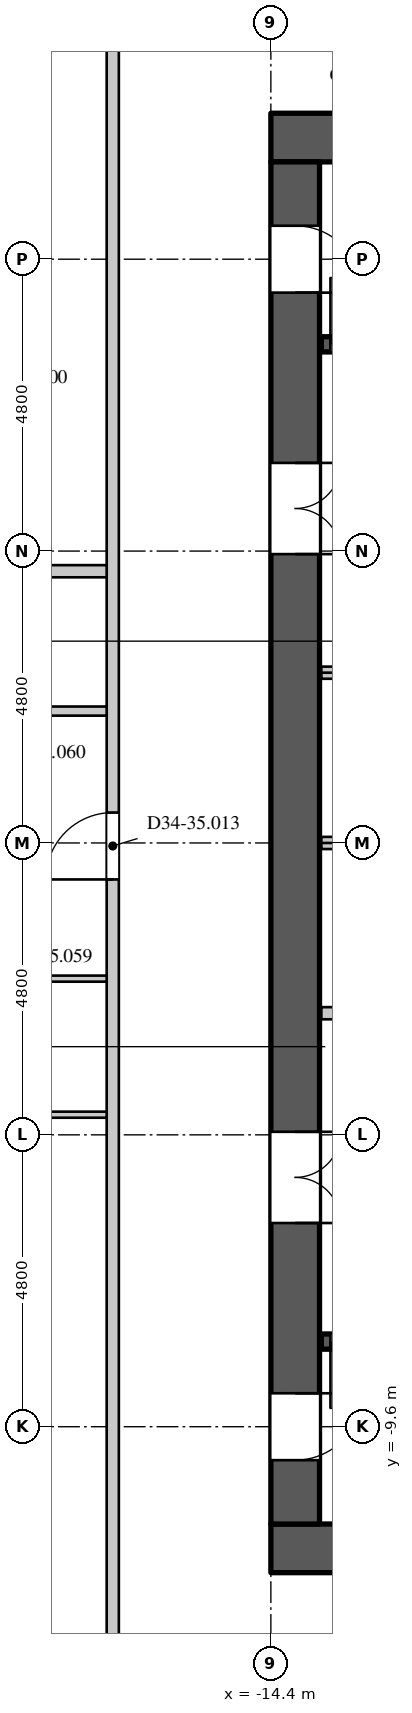
"""IFC4 building model, lengths in metres.
Left out: names, types, materials, properties, quantities, classifications, styles, units other than length and angle.
Written with IfcOpenShell. Run it as: python <this file> out.ifc"""

import sys

from ifc_helpers import new_model, si_unit, direction, frame, frame_2d, origin, place, context, subcontext, project, spatial, rectangle, extrude, element, fill, save


model = new_model("IFC4")
c1 = context("Model", 3, precision=1e-05, world=origin(), true_north=direction((0.0, 1.0)))
c2 = subcontext(c1, "Body", "Model", "MODEL_VIEW")
j1 = project(units=[si_unit("LENGTHUNIT", "METRE"), si_unit("PLANEANGLEUNIT", "RADIAN")], contexts=[c1])
p1 = place(None, origin())
s1 = spatial("IfcSite", under=j1, at=p1, CompositionType="ELEMENT")
p2 = place(p1, origin())
s2 = spatial("IfcBuilding", under=s1, at=p2, CompositionType="ELEMENT")
p3 = place(p2, frame((0.0, 0.0, 148.5)))
s3 = spatial("IfcBuildingStorey", under=s2, at=p3, CompositionType="ELEMENT", Elevation=148.5)
for number, where, z_axis, x_axis in (
    (1, (-14.4, 11.6, 0.0), (0.0, 0.0, 1.0), (1.0, 0.0, 0.0)),
    (2, (-14.4, -11.6, 0.0), (0.0, 0.0, 1.0), (1.0, 0.0, 0.0)),
):
    element("IfcWall", number, at=place(p3, frame(where, z_axis=z_axis, x_axis=x_axis)), inside=s3, PredefinedType="SHEAR", context=c2, shape_type="SweptSolid", body=[
        extrude(rectangle(XDim=28.8, YDim=0.8, at=frame_2d((14.4, 0.0))), origin(), (0.0, 0.0, 1.0), 4.2),
    ])
p4 = place(p3, frame((-14.0, -11.2, 0.0), z_axis=(0.0, 0.0, 1.0), x_axis=(0.0, 1.0, 0.0)))
e3 = element("IfcWall", 3, at=p4, inside=s3, PredefinedType="SHEAR", context=c2, shape_type="SweptSolid", body=[
    extrude(rectangle(XDim=22.4, YDim=0.8, at=frame_2d((11.2, 0.0))), origin(), (0.0, 0.0, 1.0), 4.2),
])
p5 = place(p4, frame((20.25, 0.0, 0.0)))
e4 = element("IfcOpeningElement", 4, at=p5, cuts=e3, PredefinedType="OPENING", context=c2, shape_type="SweptSolid", body=[
    extrude(rectangle(XDim=1.1, YDim=2.2, at=frame_2d((0.55, 1.1))), frame((0.0, 0.41, 0.0), z_axis=(0.0, -1.0, 0.0), x_axis=(1.0, 0.0, 0.0)), (0.0, 0.0, 1.0), 0.82),
])
p6 = place(p4, frame((1.05, 0.0, 0.0)))
e5 = element("IfcOpeningElement", 5, at=p6, cuts=e3, PredefinedType="OPENING", context=c2, shape_type="SweptSolid", body=[
    extrude(rectangle(XDim=1.1, YDim=2.2, at=frame_2d((0.55, 1.1))), frame((0.0, 0.41, 0.0), z_axis=(0.0, -1.0, 0.0), x_axis=(1.0, 0.0, 0.0)), (0.0, 0.0, 1.0), 0.82),
])
p7 = place(p4, frame((15.95, 0.0, 0.0)))
e6 = element("IfcOpeningElement", 6, at=p7, cuts=e3, PredefinedType="OPENING", context=c2, shape_type="SweptSolid", body=[
    extrude(rectangle(XDim=1.5, YDim=2.4, at=frame_2d((0.75, 1.2))), frame((0.0, 0.41, 0.0), z_axis=(0.0, -1.0, 0.0), x_axis=(1.0, 0.0, 0.0)), (0.0, 0.0, 1.0), 0.82),
])
p8 = place(p4, frame((4.95, 0.0, 0.0)))
e7 = element("IfcOpeningElement", 7, at=p8, cuts=e3, PredefinedType="OPENING", context=c2, shape_type="SweptSolid", body=[
    extrude(rectangle(XDim=1.5, YDim=2.4, at=frame_2d((0.75, 1.2))), frame((0.0, 0.41, 0.0), z_axis=(0.0, -1.0, 0.0), x_axis=(1.0, 0.0, 0.0)), (0.0, 0.0, 1.0), 0.82),
])
p9 = place(p3, frame((-17.0, -14.5, 0.0), z_axis=(0.0, 0.0, 1.0), x_axis=(0.0, 1.0, 0.0)))
e8 = element("IfcWall", 8, at=p9, inside=s3, PredefinedType="PARTITIONING", context=c2, shape_type="SweptSolid", body=[
    extrude(rectangle(XDim=29.0, YDim=0.2, at=frame_2d((14.5, 0.0))), origin(), (0.0, 0.0, 1.0), 3.798),
])
p10 = place(p9, frame((13.9, 0.0, 0.0)))
e9 = element("IfcOpeningElement", 9, at=p10, cuts=e8, PredefinedType="OPENING", context=c2, shape_type="SweptSolid", body=[
    extrude(rectangle(XDim=1.1, YDim=2.4, at=frame_2d((0.55, 1.2))), frame((0.0, 0.11, 0.0), z_axis=(0.0, -1.0, 0.0), x_axis=(1.0, 0.0, 0.0)), (0.0, 0.0, 1.0), 0.22),
])
p11 = place(p3, frame((-21.347, -11.388, 0.0), z_axis=(0.0, 0.0, 1.0), x_axis=(0.707106781187, -0.707106781187, 0.0)))
e10 = element("IfcWall", 10, at=p11, inside=s3, PredefinedType="PARTITIONING", context=c2, shape_type="SweptSolid", body=[
    extrude(rectangle(XDim=6.967, YDim=0.15, at=frame_2d((3.483, 0.0))), origin(), (0.0, 0.0, 1.0), 3.798),
])
p12 = place(p11, frame((2.75, 0.0, 0.0)))
e11 = element("IfcOpeningElement", 11, at=p12, cuts=e10, PredefinedType="OPENING", context=c2, shape_type="SweptSolid", body=[
    extrude(rectangle(XDim=0.95, YDim=2.2, at=frame_2d((0.475, 1.1))), frame((0.0, 0.085, 0.0), z_axis=(0.0, -1.0, 0.0), x_axis=(1.0, 0.0, 0.0)), (0.0, 0.0, 1.0), 0.17),
])
p13 = place(p3, frame((-21.347, 11.388, 0.0), z_axis=(0.0, 0.0, 1.0), x_axis=(0.707106781187, 0.707106781187, 0.0)))
e12 = element("IfcWall", 12, at=p13, inside=s3, PredefinedType="PARTITIONING", context=c2, shape_type="SweptSolid", body=[
    extrude(rectangle(XDim=8.836, YDim=0.15, at=frame_2d((4.418, 0.0))), origin(), (0.0, 0.0, 1.0), 3.798),
])
p14 = place(p13, frame((2.75, 0.0, 0.0)))
e13 = element("IfcOpeningElement", 13, at=p14, cuts=e12, PredefinedType="OPENING", context=c2, shape_type="SweptSolid", body=[
    extrude(rectangle(XDim=0.95, YDim=2.2, at=frame_2d((0.475, 1.1))), frame((0.0, 0.085, 0.0), z_axis=(0.0, -1.0, 0.0), x_axis=(1.0, 0.0, 0.0)), (0.0, 0.0, 1.0), 0.17),
])
p15 = place(p13, frame((7.45, 0.0, 0.0)))
e14 = element("IfcOpeningElement", 14, at=p15, cuts=e12, PredefinedType="OPENING", context=c2, shape_type="SweptSolid", body=[
    extrude(rectangle(XDim=0.95, YDim=2.2, at=frame_2d((0.475, 1.1))), frame((0.0, 0.085, 0.0), z_axis=(0.0, -1.0, 0.0), x_axis=(1.0, 0.0, 0.0)), (0.0, 0.0, 1.0), 0.17),
])
p16 = place(p3, frame((-20.725, 2.169, 0.0), z_axis=(0.0, 0.0, 1.0), x_axis=(1.0, 0.0, 0.0)))
e15 = element("IfcWall", 15, at=p16, inside=s3, PredefinedType="PARTITIONING", context=c2, shape_type="SweptSolid", body=[
    extrude(rectangle(XDim=3.625, YDim=0.15, at=frame_2d((1.812, 0.0))), origin(), (0.0, 0.0, 1.0), 3.798),
])
p17 = place(p16, frame((0.85, 0.0, 0.0)))
e16 = element("IfcOpeningElement", 16, at=p17, cuts=e15, PredefinedType="OPENING", context=c2, shape_type="SweptSolid", body=[
    extrude(rectangle(XDim=0.95, YDim=2.2, at=frame_2d((0.475, 1.1))), frame((0.0, 0.085, 0.0), z_axis=(0.0, -1.0, 0.0), x_axis=(1.0, 0.0, 0.0)), (0.0, 0.0, 1.0), 0.17),
])
p18 = place(p3, frame((-25.65, 4.469, 0.0), z_axis=(0.0, 0.0, 1.0), x_axis=(1.0, 0.0, 0.0)))
e17 = element("IfcWall", 17, at=p18, inside=s3, PredefinedType="PARTITIONING", context=c2, shape_type="SweptSolid", body=[
    extrude(rectangle(XDim=8.55, YDim=0.2, at=frame_2d((4.275, 0.0))), origin(), (0.0, 0.0, 1.0), 3.15),
])
p19 = place(p3, frame((-13.57, -2.8, 0.0), z_axis=(0.0, 0.0, 1.0), x_axis=(1.0, 0.0, 0.0)))
e18 = element("IfcWall", 18, at=p19, inside=s3, PredefinedType="PARTITIONING", context=c2, shape_type="SweptSolid", body=[
    extrude(rectangle(XDim=3.19, YDim=0.2, at=frame_2d((1.595, 0.0))), origin(), (0.0, 0.0, 1.0), 3.798),
])
p20 = place(p19, frame((1.25, 0.0, 0.0)))
e19 = element("IfcOpeningElement", 19, at=p20, cuts=e18, PredefinedType="OPENING", context=c2, shape_type="SweptSolid", body=[
    extrude(rectangle(XDim=0.6, YDim=2.0, at=frame_2d((0.3, 1.0))), frame((0.0, 0.11, 0.0), z_axis=(0.0, -1.0, 0.0), x_axis=(1.0, 0.0, 0.0)), (0.0, 0.0, 1.0), 0.22),
])
p21 = place(p3, frame((-13.57, 0.0, 0.0), z_axis=(0.0, 0.0, 1.0), x_axis=(1.0, 0.0, 0.0)))
e20 = element("IfcWall", 20, at=p21, inside=s3, PredefinedType="PARTITIONING", context=c2, shape_type="SweptSolid", body=[
    extrude(rectangle(XDim=23.97, YDim=0.2, at=frame_2d((11.985, 0.0))), origin(), (0.0, 0.0, 1.0), 3.798),
])
p22 = place(p3, frame((-13.57, 2.8, 0.0), z_axis=(0.0, 0.0, 1.0), x_axis=(1.0, 0.0, 0.0)))
e21 = element("IfcWall", 21, at=p22, inside=s3, PredefinedType="PARTITIONING", context=c2, shape_type="SweptSolid", body=[
    extrude(rectangle(XDim=23.97, YDim=0.2, at=frame_2d((11.985, 0.0))), origin(), (0.0, 0.0, 1.0), 3.798),
])
p23 = place(p22, frame((1.0, 0.0, 0.0)))
e22 = element("IfcOpeningElement", 22, at=p23, cuts=e21, PredefinedType="OPENING", context=c2, shape_type="SweptSolid", body=[
    extrude(rectangle(XDim=1.1, YDim=2.2, at=frame_2d((0.55, 1.1))), frame((0.0, 0.11, 0.0), z_axis=(0.0, -1.0, 0.0), x_axis=(1.0, 0.0, 0.0)), (0.0, 0.0, 1.0), 0.22),
])
p24 = place(p22, frame((3.9, 0.0, 0.0)))
e23 = element("IfcOpeningElement", 23, at=p24, cuts=e21, PredefinedType="OPENING", context=c2, shape_type="SweptSolid", body=[
    extrude(rectangle(XDim=1.1, YDim=2.2, at=frame_2d((0.55, 1.1))), frame((0.0, 0.11, 0.0), z_axis=(0.0, -1.0, 0.0), x_axis=(1.0, 0.0, 0.0)), (0.0, 0.0, 1.0), 0.22),
])
p25 = place(p22, frame((6.5, 0.0, 0.0)))
e24 = element("IfcOpeningElement", 24, at=p25, cuts=e21, PredefinedType="OPENING", context=c2, shape_type="SweptSolid", body=[
    extrude(rectangle(XDim=1.1, YDim=2.2, at=frame_2d((0.55, 1.1))), frame((0.0, 0.11, 0.0), z_axis=(0.0, -1.0, 0.0), x_axis=(1.0, 0.0, 0.0)), (0.0, 0.0, 1.0), 0.22),
])
p26 = place(p22, frame((9.1, 0.0, 0.0)))
e25 = element("IfcOpeningElement", 25, at=p26, cuts=e21, PredefinedType="OPENING", context=c2, shape_type="SweptSolid", body=[
    extrude(rectangle(XDim=1.1, YDim=2.2, at=frame_2d((0.55, 1.1))), frame((0.0, 0.11, 0.0), z_axis=(0.0, -1.0, 0.0), x_axis=(1.0, 0.0, 0.0)), (0.0, 0.0, 1.0), 0.22),
])
p27 = place(p22, frame((11.7, 0.0, 0.0)))
e26 = element("IfcOpeningElement", 26, at=p27, cuts=e21, PredefinedType="OPENING", context=c2, shape_type="SweptSolid", body=[
    extrude(rectangle(XDim=1.1, YDim=2.2, at=frame_2d((0.55, 1.1))), frame((0.0, 0.11, 0.0), z_axis=(0.0, -1.0, 0.0), x_axis=(1.0, 0.0, 0.0)), (0.0, 0.0, 1.0), 0.22),
])
p28 = place(p22, frame((14.3, 0.0, 0.0)))
e27 = element("IfcOpeningElement", 27, at=p28, cuts=e21, PredefinedType="OPENING", context=c2, shape_type="SweptSolid", body=[
    extrude(rectangle(XDim=1.1, YDim=2.2, at=frame_2d((0.55, 1.1))), frame((0.0, 0.11, 0.0), z_axis=(0.0, -1.0, 0.0), x_axis=(1.0, 0.0, 0.0)), (0.0, 0.0, 1.0), 0.22),
])
p29 = place(p22, frame((16.9, 0.0, 0.0)))
e28 = element("IfcOpeningElement", 28, at=p29, cuts=e21, PredefinedType="OPENING", context=c2, shape_type="SweptSolid", body=[
    extrude(rectangle(XDim=1.1, YDim=2.2, at=frame_2d((0.55, 1.1))), frame((0.0, 0.11, 0.0), z_axis=(0.0, -1.0, 0.0), x_axis=(1.0, 0.0, 0.0)), (0.0, 0.0, 1.0), 0.22),
])
p30 = place(p22, frame((19.5, 0.0, 0.0)))
e29 = element("IfcOpeningElement", 29, at=p30, cuts=e21, PredefinedType="OPENING", context=c2, shape_type="SweptSolid", body=[
    extrude(rectangle(XDim=1.1, YDim=2.2, at=frame_2d((0.55, 1.1))), frame((0.0, 0.11, 0.0), z_axis=(0.0, -1.0, 0.0), x_axis=(1.0, 0.0, 0.0)), (0.0, 0.0, 1.0), 0.22),
])
p31 = place(p3, frame((-13.57, -8.2, 0.0), z_axis=(0.0, 0.0, 1.0), x_axis=(1.0, 0.0, 0.0)))
e30 = element("IfcWall", 30, at=p31, inside=s3, PredefinedType="SHEAR", context=c2, shape_type="SweptSolid", body=[
    extrude(rectangle(XDim=8.295, YDim=0.25, at=frame_2d((4.147, 0.0))), origin(), (0.0, 0.0, 1.0), 3.798),
])
p32 = place(p31, frame((0.15, 0.0, 0.0)))
e31 = element("IfcOpeningElement", 31, at=p32, cuts=e30, PredefinedType="OPENING", context=c2, shape_type="SweptSolid", body=[
    extrude(rectangle(XDim=1.1, YDim=2.2, at=frame_2d((0.55, 1.1))), frame((0.0, 0.135, 0.0), z_axis=(0.0, -1.0, 0.0), x_axis=(1.0, 0.0, 0.0)), (0.0, 0.0, 1.0), 0.27),
])
p33 = place(p3, frame((-13.57, 8.2, 0.0), z_axis=(0.0, 0.0, 1.0), x_axis=(1.0, 0.0, 0.0)))
e32 = element("IfcWall", 32, at=p33, inside=s3, PredefinedType="SHEAR", context=c2, shape_type="SweptSolid", body=[
    extrude(rectangle(XDim=8.295, YDim=0.25, at=frame_2d((4.147, 0.0))), origin(), (0.0, 0.0, 1.0), 3.798),
])
p34 = place(p33, frame((0.15, 0.0, 0.0)))
e33 = element("IfcOpeningElement", 33, at=p34, cuts=e32, PredefinedType="OPENING", context=c2, shape_type="SweptSolid", body=[
    extrude(rectangle(XDim=1.1, YDim=2.2, at=frame_2d((0.55, 1.1))), frame((0.0, 0.135, 0.0), z_axis=(0.0, -1.0, 0.0), x_axis=(1.0, 0.0, 0.0)), (0.0, 0.0, 1.0), 0.27),
])
p35 = place(p3, frame((-20.8, -4.469, 0.0), z_axis=(0.0, 0.0, 1.0), x_axis=(1.0, 0.0, 0.0)))
e34 = element("IfcWall", 34, at=p35, inside=s3, PredefinedType="PARTITIONING", context=c2, shape_type="SweptSolid", body=[
    extrude(rectangle(XDim=3.7, YDim=0.1, at=frame_2d((1.85, 0.0))), origin(), (0.0, 0.0, 1.0), 3.15),
])
p36 = place(p35, frame((0.95, 0.0, 0.0)))
e35 = element("IfcOpeningElement", 35, at=p36, cuts=e34, PredefinedType="OPENING", context=c2, shape_type="SweptSolid", body=[
    extrude(rectangle(XDim=0.9, YDim=2.2, at=frame_2d((0.45, 1.1))), frame((0.0, 0.06, 0.0), z_axis=(0.0, -1.0, 0.0), x_axis=(1.0, 0.0, 0.0)), (0.0, 0.0, 1.0), 0.12),
])
p37 = place(p3, frame((-20.725, -2.231, 0.0), z_axis=(0.0, 0.0, 1.0), x_axis=(1.0, 0.0, 0.0)))
e36 = element("IfcWall", 36, at=p37, inside=s3, PredefinedType="PARTITIONING", context=c2, shape_type="SweptSolid", body=[
    extrude(rectangle(XDim=3.625, YDim=0.1, at=frame_2d((1.812, 0.0))), origin(), (0.0, 0.0, 1.0), 3.798),
])
p38 = place(p37, frame((0.85, 0.0, 0.0)))
e37 = element("IfcOpeningElement", 37, at=p38, cuts=e36, PredefinedType="OPENING", context=c2, shape_type="SweptSolid", body=[
    extrude(rectangle(XDim=0.9, YDim=2.2, at=frame_2d((0.45, 1.1))), frame((0.0, 0.06, 0.0), z_axis=(0.0, -1.0, 0.0), x_axis=(1.0, 0.0, 0.0)), (0.0, 0.0, 1.0), 0.12),
])
p39 = place(p34, origin())
e38 = element("IfcDoor", 38, at=p39, inside=s3, OperationType="SINGLE_SWING_LEFT", PredefinedType="DOOR", context=c2, shape_type="SweptSolid", body=[
    extrude(rectangle(XDim=1.1, YDim=2.2, at=frame_2d((0.55, 1.1))), frame((0.0, 0.025, 0.0), z_axis=(0.0, -1.0, 0.0), x_axis=(1.0, 0.0, 0.0)), (0.0, 0.0, 1.0), 0.05),
])
fill(e33, e38)
p40 = place(p32, origin())
e39 = element("IfcDoor", 39, at=p40, inside=s3, OperationType="SINGLE_SWING_RIGHT", PredefinedType="DOOR", context=c2, shape_type="SweptSolid", body=[
    extrude(rectangle(XDim=1.1, YDim=2.2, at=frame_2d((0.55, 1.1))), frame((0.0, 0.025, 0.0), z_axis=(0.0, -1.0, 0.0), x_axis=(1.0, 0.0, 0.0)), (0.0, 0.0, 1.0), 0.05),
])
fill(e31, e39)
p41 = place(p5, origin())
e40 = element("IfcDoor", 40, at=p41, inside=s3, OperationType="SINGLE_SWING_RIGHT", PredefinedType="DOOR", context=c2, shape_type="SweptSolid", body=[
    extrude(rectangle(XDim=1.1, YDim=2.2, at=frame_2d((0.55, 1.1))), frame((0.0, -0.345, 0.0), z_axis=(0.0, -1.0, 0.0), x_axis=(1.0, 0.0, 0.0)), (0.0, 0.0, 1.0), 0.05),
])
fill(e4, e40)
p42 = place(p6, origin())
e41 = element("IfcDoor", 41, at=p42, inside=s3, OperationType="SINGLE_SWING_LEFT", PredefinedType="DOOR", context=c2, shape_type="SweptSolid", body=[
    extrude(rectangle(XDim=1.1, YDim=2.2, at=frame_2d((0.55, 1.1))), frame((0.0, -0.345, 0.0), z_axis=(0.0, -1.0, 0.0), x_axis=(1.0, 0.0, 0.0)), (0.0, 0.0, 1.0), 0.05),
])
fill(e5, e41)
p43 = place(p7, origin())
e42 = element("IfcDoor", 42, at=p43, inside=s3, OperationType="DOUBLE_DOOR_SINGLE_SWING", PredefinedType="DOOR", context=c2, shape_type="SweptSolid", body=[
    extrude(rectangle(XDim=1.5, YDim=2.4, at=frame_2d((0.75, 1.2))), frame((0.0, -0.345, 0.0), z_axis=(0.0, -1.0, 0.0), x_axis=(1.0, 0.0, 0.0)), (0.0, 0.0, 1.0), 0.05),
])
fill(e6, e42)
p44 = place(p8, origin())
e43 = element("IfcDoor", 43, at=p44, inside=s3, OperationType="DOUBLE_DOOR_SINGLE_SWING", PredefinedType="DOOR", context=c2, shape_type="SweptSolid", body=[
    extrude(rectangle(XDim=1.5, YDim=2.4, at=frame_2d((0.75, 1.2))), frame((0.0, -0.345, 0.0), z_axis=(0.0, -1.0, 0.0), x_axis=(1.0, 0.0, 0.0)), (0.0, 0.0, 1.0), 0.05),
])
fill(e7, e43)
p45 = place(p10, origin())
e44 = element("IfcDoor", 44, at=p45, inside=s3, OperationType="SINGLE_SWING_LEFT", PredefinedType="DOOR", context=c2, shape_type="SweptSolid", body=[
    extrude(rectangle(XDim=1.1, YDim=2.4, at=frame_2d((0.55, 1.2))), frame((0.0, 0.025, 0.0), z_axis=(0.0, -1.0, 0.0), x_axis=(1.0, 0.0, 0.0)), (0.0, 0.0, 1.0), 0.05),
])
fill(e9, e44)
save(model, sys.argv[1])
